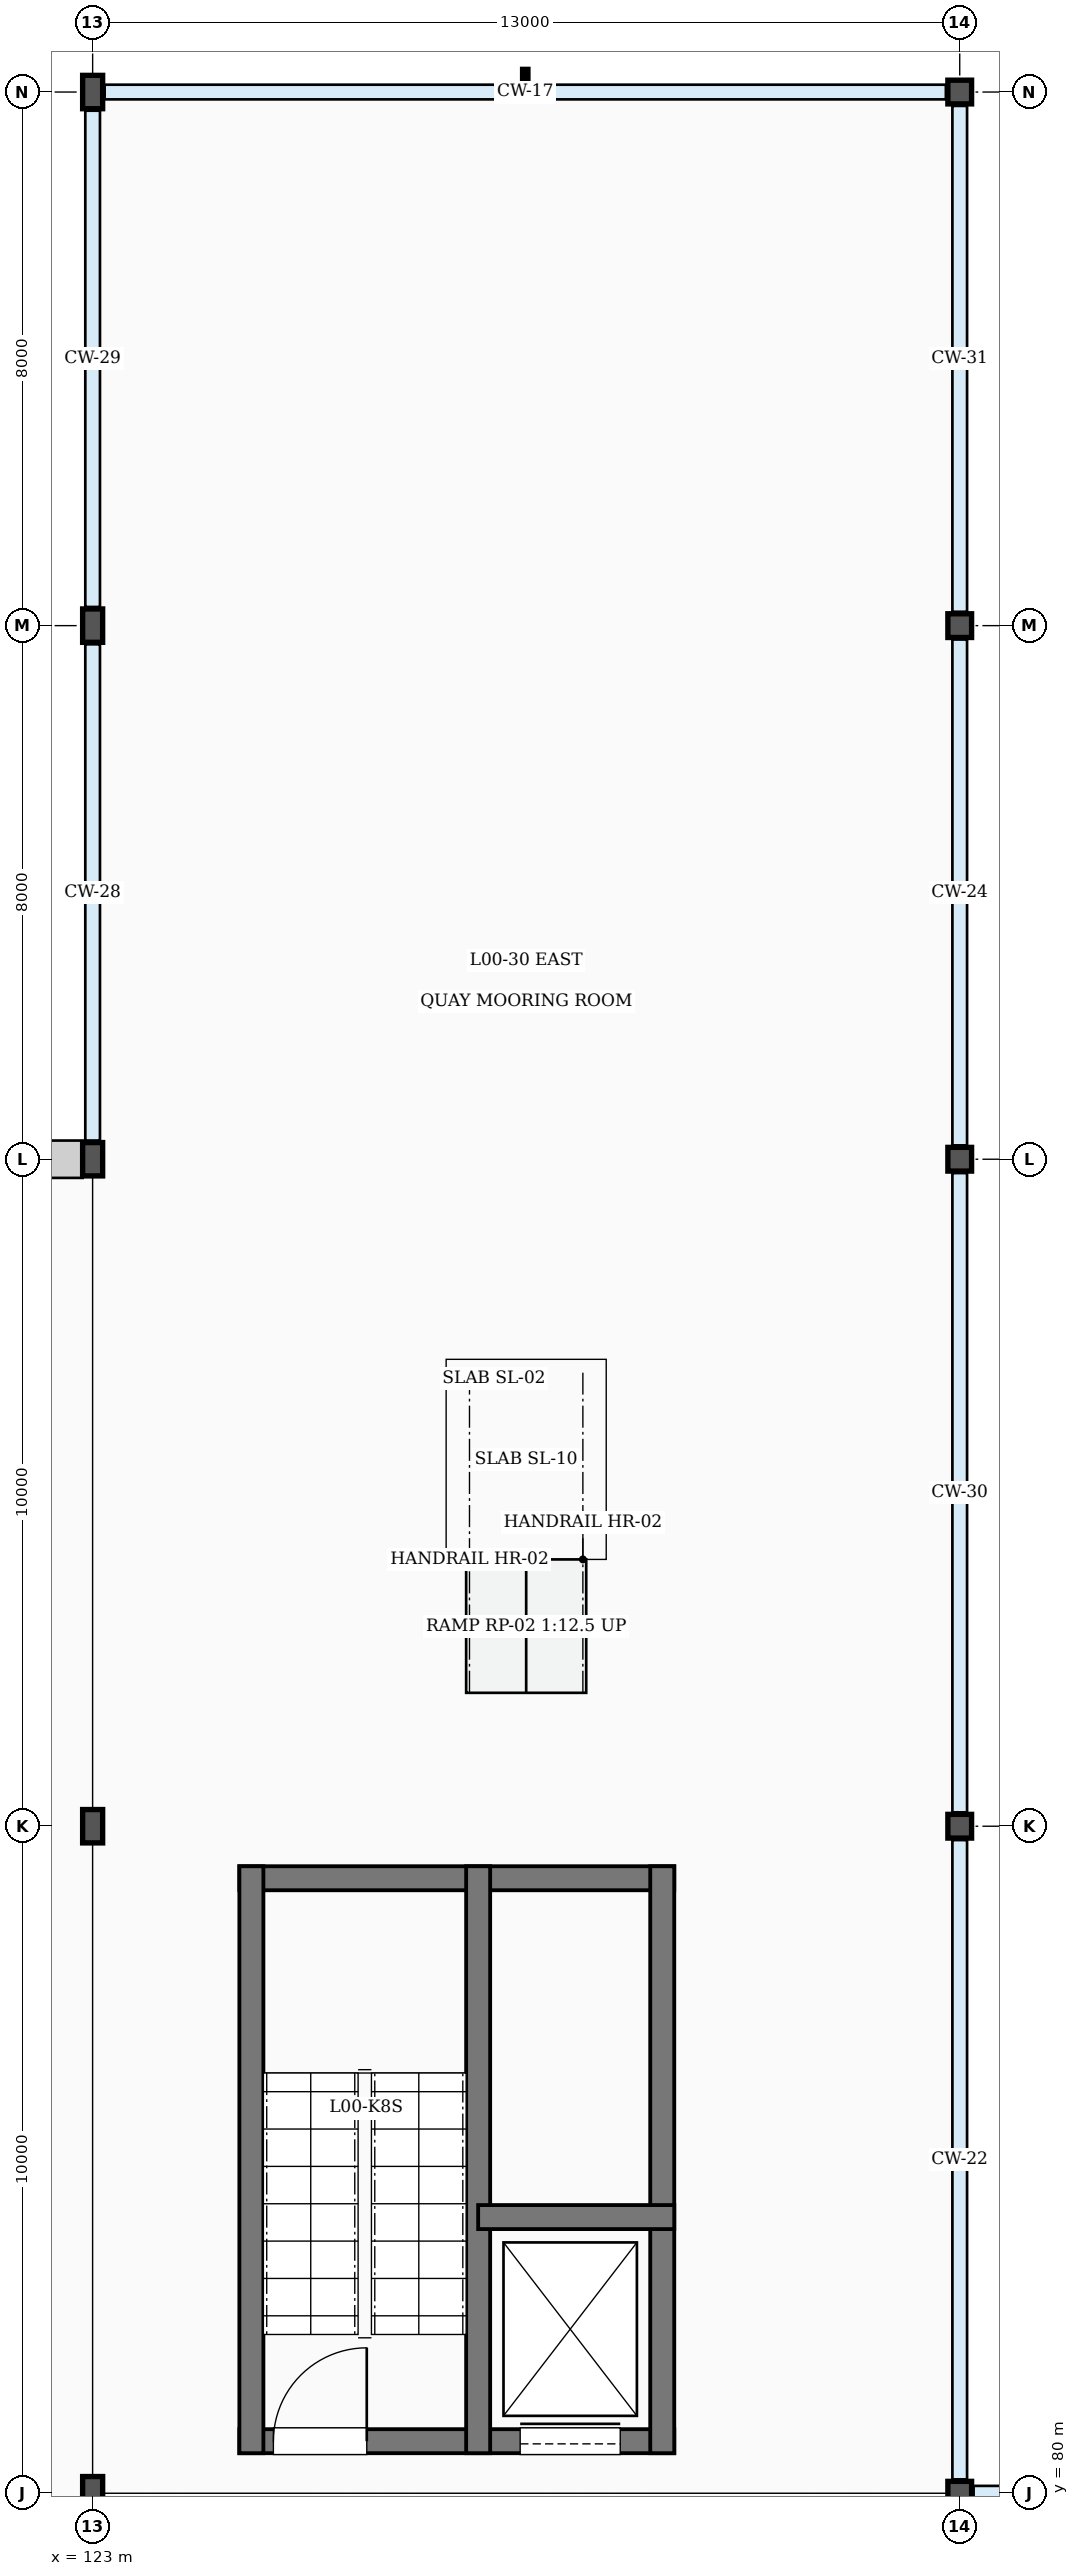
"""IFC4 building model, lengths in metres.
Left out: names, types, materials, properties, quantities, classifications, styles, units other than length and angle.
Written with IfcOpenShell. Run it as: python <this file> out.ifc"""

import sys

from ifc_helpers import new_model, si_unit, direction, frame, frame_2d, origin, origin_2d, place, context, subcontext, project, spatial, rectangle, hollow_circle, i_section, extrude, element, fill, save


model = new_model("IFC4")
c1 = context("Model", 3, precision=1e-05, world=origin(), true_north=direction((0.0, 1.0)))
c2 = subcontext(c1, "Body", "Model", "MODEL_VIEW")
j1 = project(units=[si_unit("LENGTHUNIT", "METRE"), si_unit("PLANEANGLEUNIT", "RADIAN")], contexts=[c1])
p1 = place(None, origin())
s1 = spatial("IfcSite", under=j1, at=p1, CompositionType="ELEMENT")
p2 = place(p1, origin())
s2 = spatial("IfcBuilding", under=s1, at=p2, CompositionType="ELEMENT")
p3 = place(p2, origin())
s3 = spatial("IfcBuildingStorey", under=s2, at=p3, CompositionType="ELEMENT", Elevation=0.0)
for number, where, z_axis, x_axis in (
    (1, (123.0, 80.0, 0.0), (0.0, 0.0, 1.0), (1.0, 0.0, 0.0)),
    (2, (123.0, 90.0, 0.0), (0.0, 0.0, 1.0), (1.0, 0.0, 0.0)),
    (3, (123.0, 100.0, 0.0), (0.0, 0.0, 1.0), (1.0, 0.0, 0.0)),
    (4, (123.0, 108.0, 0.0), (0.0, 0.0, 1.0), (1.0, 0.0, 0.0)),
    (5, (123.0, 116.0, 0.0), (0.0, 0.0, 1.0), (1.0, 0.0, 0.0)),
):
    element("IfcColumn", number, at=place(p3, frame(where, z_axis=z_axis, x_axis=x_axis)), inside=s3, PredefinedType="COLUMN", context=c2, shape_type="SweptSolid", body=[
        extrude(i_section(OverallWidth=0.3, OverallDepth=0.5, WebThickness=0.014, FlangeThickness=0.028, FilletRadius=0.027, at=origin_2d()), origin(), (0.0, 0.0, 1.0), 5.4),
    ])
for number, where, z_axis, x_axis in (
    (6, (136.0, 80.0, 0.0), (0.0, 0.0, 1.0), (1.0, 0.0, 0.0)),
    (7, (136.0, 90.0, 0.0), (0.0, 0.0, 1.0), (1.0, 0.0, 0.0)),
    (8, (136.0, 100.0, 0.0), (0.0, 0.0, 1.0), (1.0, 0.0, 0.0)),
    (9, (136.0, 108.0, 0.0), (0.0, 0.0, 1.0), (1.0, 0.0, 0.0)),
    (10, (136.0, 116.0, 0.0), (0.0, 0.0, 1.0), (1.0, 0.0, 0.0)),
):
    element("IfcColumn", number, at=place(p3, frame(where, z_axis=z_axis, x_axis=x_axis)), inside=s3, PredefinedType="COLUMN", context=c2, shape_type="SweptSolid", body=[
        extrude(hollow_circle(Radius=0.178, WallThickness=0.016, at=origin_2d()), origin(), (0.0, 0.0, 1.0), 5.4),
    ])
p4 = place(p3, frame((113.15, 100.0, 0.0), z_axis=(0.0, 0.0, 1.0), x_axis=(1.0, 0.0, 0.0)))
e11 = element("IfcWall", 11, at=p4, inside=s3, PredefinedType="SOLIDWALL", context=c2, shape_type="SweptSolid", body=[
    extrude(rectangle(XDim=9.7, YDim=0.56, at=frame_2d((4.85, 0.0))), origin(), (0.0, 0.0, 1.0), 4.58),
])
p5 = place(p4, frame((3.75, 0.0, 0.0)))
e12 = element("IfcOpeningElement", 12, at=p5, cuts=e11, PredefinedType="OPENING", context=c2, shape_type="SweptSolid", body=[
    extrude(rectangle(XDim=2.2, YDim=2.45, at=frame_2d((1.1, 1.225))), frame((0.0, 0.29, 0.0), z_axis=(0.0, -1.0, 0.0), x_axis=(1.0, 0.0, 0.0)), (0.0, 0.0, 1.0), 0.58),
])
p6 = place(p3, frame((125.2, 80.78, 0.0), z_axis=(0.0, 0.0, 1.0), x_axis=(1.0, 0.0, 0.0)))
e13 = element("IfcWall", 13, at=p6, inside=s3, PredefinedType="SHEAR", context=c2, shape_type="SweptSolid", body=[
    extrude(rectangle(XDim=6.52, YDim=0.36, at=frame_2d((3.26, 0.0))), origin(), (0.0, 0.0, 1.0), 5.4),
])
p7 = place(p6, frame((0.51, 0.0, 0.0)))
e14 = element("IfcOpeningElement", 14, at=p7, cuts=e13, PredefinedType="OPENING", context=c2, shape_type="SweptSolid", body=[
    extrude(rectangle(XDim=1.4, YDim=2.35, at=frame_2d((0.7, 1.175))), frame((0.0, 0.19, 0.0), z_axis=(0.0, -1.0, 0.0), x_axis=(1.0, 0.0, 0.0)), (0.0, 0.0, 1.0), 0.38),
])
p8 = place(p6, frame((4.21, 0.0, 0.0)))
e15 = element("IfcOpeningElement", 15, at=p8, cuts=e13, PredefinedType="OPENING", context=c2, shape_type="SweptSolid", body=[
    extrude(rectangle(XDim=1.5, YDim=2.4, at=frame_2d((0.75, 1.2))), frame((0.0, 0.19, 0.0), z_axis=(0.0, -1.0, 0.0), x_axis=(1.0, 0.0, 0.0)), (0.0, 0.0, 1.0), 0.38),
])
p9 = place(p3, frame((125.2, 89.22, 0.0), z_axis=(0.0, 0.0, 1.0), x_axis=(1.0, 0.0, 0.0)))
e16 = element("IfcWall", 16, at=p9, inside=s3, PredefinedType="SHEAR", context=c2, shape_type="SweptSolid", body=[
    extrude(rectangle(XDim=6.52, YDim=0.36, at=frame_2d((3.26, 0.0))), origin(), (0.0, 0.0, 1.0), 5.4),
])
for number, where, z_axis, x_axis in (
    (17, (125.38, 80.6, 0.0), (0.0, 0.0, 1.0), (0.0, 1.0, 0.0)),
    (18, (131.54, 80.6, 0.0), (0.0, 0.0, 1.0), (0.0, 1.0, 0.0)),
    (19, (128.78, 80.6, 0.0), (0.0, 0.0, 1.0), (0.0, 1.0, 0.0)),
):
    element("IfcWall", number, at=place(p3, frame(where, z_axis=z_axis, x_axis=x_axis)), inside=s3, PredefinedType="SHEAR", context=c2, shape_type="SweptSolid", body=[
        extrude(rectangle(XDim=8.8, YDim=0.36, at=frame_2d((4.4, 0.0))), origin(), (0.0, 0.0, 1.0), 5.4),
    ])
p10 = place(p3, frame((128.78, 84.14, 0.0), z_axis=(0.0, 0.0, 1.0), x_axis=(1.0, 0.0, 0.0)))
e20 = element("IfcWall", 20, at=p10, inside=s3, PredefinedType="SHEAR", context=c2, shape_type="SweptSolid", body=[
    extrude(rectangle(XDim=2.94, YDim=0.36, at=frame_2d((1.47, 0.0))), origin(), (0.0, 0.0, 1.0), 5.4),
])
p11 = place(p7, origin())
e21 = element("IfcDoor", 21, at=p11, inside=s3, OperationType="SINGLE_SWING_RIGHT", PredefinedType="DOOR", context=c2, shape_type="SweptSolid", body=[
    extrude(rectangle(XDim=1.4, YDim=2.35, at=frame_2d((0.7, 1.175))), frame((0.0, 0.025, 0.0), z_axis=(0.0, -1.0, 0.0), x_axis=(1.0, 0.0, 0.0)), (0.0, 0.0, 1.0), 0.05),
])
fill(e14, e21)
p12 = place(p8, origin())
e22 = element("IfcDoor", 22, at=p12, inside=s3, OperationType="SLIDING_TO_LEFT", PredefinedType="DOOR", context=c2, shape_type="SweptSolid", body=[
    extrude(rectangle(XDim=1.5, YDim=2.4, at=frame_2d((0.75, 1.2))), frame((0.0, 0.025, 0.0), z_axis=(0.0, -1.0, 0.0), x_axis=(1.0, 0.0, 0.0)), (0.0, 0.0, 1.0), 0.05),
])
fill(e15, e22)
save(model, sys.argv[1])
